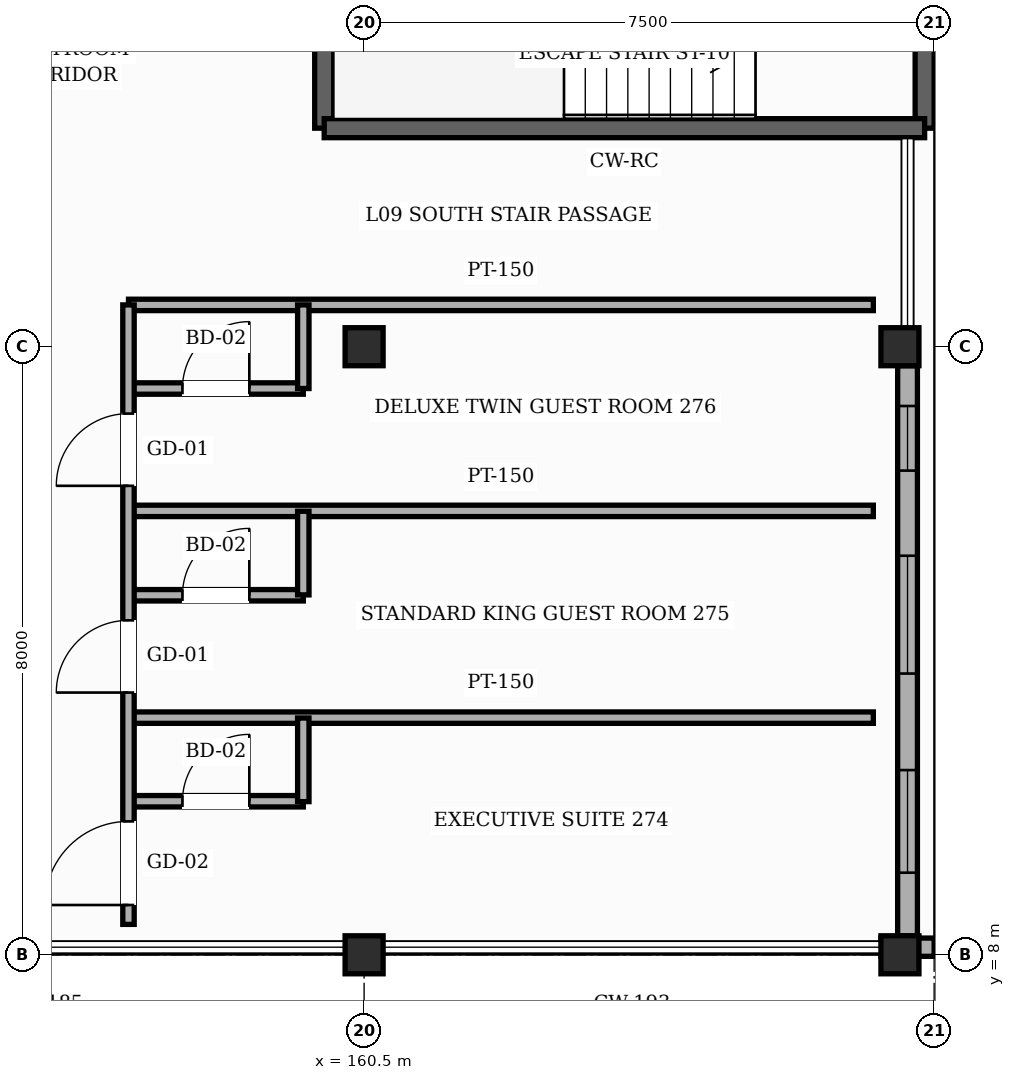
"""IFC4 building model, lengths in metres.
Left out: names, types, materials, properties, quantities, classifications, styles, units other than length and angle.
Written with IfcOpenShell. Run it as: python <this file> out.ifc"""

import sys

from ifc_helpers import new_model, si_unit, direction, frame, frame_2d, origin, origin_2d, place, context, subcontext, project, spatial, rectangle, hollow_rectangle, extrude, element, fill, save


model = new_model("IFC4")
c1 = context("Model", 3, precision=1e-05, world=origin(), true_north=direction((0.0, 1.0)))
c2 = subcontext(c1, "Body", "Model", "MODEL_VIEW")
j1 = project(units=[si_unit("LENGTHUNIT", "METRE"), si_unit("PLANEANGLEUNIT", "RADIAN")], contexts=[c1])
p1 = place(None, origin())
s1 = spatial("IfcSite", under=j1, at=p1, CompositionType="ELEMENT")
p2 = place(p1, origin())
s2 = spatial("IfcBuilding", under=s1, at=p2, CompositionType="ELEMENT")
p3 = place(p2, frame((0.0, 0.0, 39.0)))
s3 = spatial("IfcBuildingStorey", under=s2, at=p3, CompositionType="ELEMENT", Elevation=39.0)
p4 = place(p3, frame((160.5, 8.0, 0.0), z_axis=(0.0, 0.0, 1.0), x_axis=(1.0, 0.0, 0.0)))
e1 = element("IfcColumn", 1, at=p4, inside=s3, PredefinedType="COLUMN", context=c2, shape_type="SweptSolid", body=[
    extrude(hollow_rectangle(XDim=0.5, YDim=0.5, WallThickness=0.022, InnerFilletRadius=0.022, OuterFilletRadius=0.044, at=origin_2d()), origin(), (0.0, 0.0, 1.0), 3.38),
])
p5 = place(p3, frame((160.5, 16.0, 0.0), z_axis=(0.0, 0.0, 1.0), x_axis=(1.0, 0.0, 0.0)))
e2 = element("IfcColumn", 2, at=p5, inside=s3, PredefinedType="COLUMN", context=c2, shape_type="SweptSolid", body=[
    extrude(hollow_rectangle(XDim=0.5, YDim=0.5, WallThickness=0.022, InnerFilletRadius=0.022, OuterFilletRadius=0.044, at=origin_2d()), origin(), (0.0, 0.0, 1.0), 3.6),
])
p6 = place(p3, frame((167.55, 8.0, 0.0), z_axis=(0.0, 0.0, 1.0), x_axis=(1.0, 0.0, 0.0)))
e3 = element("IfcColumn", 3, at=p6, inside=s3, PredefinedType="COLUMN", context=c2, shape_type="SweptSolid", body=[
    extrude(hollow_rectangle(XDim=0.5, YDim=0.5, WallThickness=0.022, InnerFilletRadius=0.022, OuterFilletRadius=0.044, at=origin_2d()), origin(), (0.0, 0.0, 1.0), 3.38),
])
p7 = place(p3, frame((167.55, 16.0, 0.0), z_axis=(0.0, 0.0, 1.0), x_axis=(1.0, 0.0, 0.0)))
e4 = element("IfcColumn", 4, at=p7, inside=s3, PredefinedType="COLUMN", context=c2, shape_type="SweptSolid", body=[
    extrude(hollow_rectangle(XDim=0.5, YDim=0.5, WallThickness=0.022, InnerFilletRadius=0.022, OuterFilletRadius=0.044, at=origin_2d()), origin(), (0.0, 0.0, 1.0), 3.6),
])
p8 = place(p3, frame((167.65, 15.75, 0.0), z_axis=(0.0, 0.0, 1.0), x_axis=(0.0, -1.0, 0.0)))
e5 = element("IfcWall", 5, at=p8, inside=s3, PredefinedType="SOLIDWALL", context=c2, shape_type="SweptSolid", body=[
    extrude(rectangle(XDim=7.5, YDim=0.26, at=frame_2d((3.75, 0.0))), origin(), (0.0, 0.0, 1.0), 2.755),
])
p9 = place(p8, frame((5.32, 0.0, 0.85)))
e6 = element("IfcOpeningElement", 6, at=p9, cuts=e5, PredefinedType="OPENING", context=c2, shape_type="SweptSolid", body=[
    extrude(rectangle(XDim=1.35, YDim=1.35, at=frame_2d((0.675, 0.675))), frame((0.0, 0.14, 0.0), z_axis=(0.0, -1.0, 0.0), x_axis=(1.0, 0.0, 0.0)), (0.0, 0.0, 1.0), 0.28),
])
p10 = place(p8, frame((2.5, 0.0, 0.85)))
e7 = element("IfcOpeningElement", 7, at=p10, cuts=e5, PredefinedType="OPENING", context=c2, shape_type="SweptSolid", body=[
    extrude(rectangle(XDim=1.55, YDim=1.35, at=frame_2d((0.775, 0.675))), frame((0.0, 0.14, 0.0), z_axis=(0.0, -1.0, 0.0), x_axis=(1.0, 0.0, 0.0)), (0.0, 0.0, 1.0), 0.28),
])
p11 = place(p8, frame((0.53, 0.0, 0.85)))
e8 = element("IfcOpeningElement", 8, at=p11, cuts=e5, PredefinedType="OPENING", context=c2, shape_type="SweptSolid", body=[
    extrude(rectangle(XDim=0.85, YDim=1.35, at=frame_2d((0.425, 0.675))), frame((0.0, 0.14, 0.0), z_axis=(0.0, -1.0, 0.0), x_axis=(1.0, 0.0, 0.0)), (0.0, 0.0, 1.0), 0.28),
])
p12 = place(p3, frame((168.0, 8.1, 0.0), z_axis=(0.0, 0.0, 1.0), x_axis=(-1.0, 0.0, 0.0)))
e9 = element("IfcWall", 9, at=p12, inside=s3, PredefinedType="SOLIDWALL", context=c2, shape_type="SweptSolid", body=[
    extrude(rectangle(XDim=0.7, YDim=0.24, at=frame_2d((0.35, 0.0))), origin(), (0.0, 0.0, 1.0), 3.365),
])
for number, where, z_axis, x_axis in (
    (10, (167.875, 22.225, 0.0), (0.0, 0.0, 1.0), (0.0, -1.0, 0.0)),
    (11, (159.975, 18.875, 0.0), (0.0, 0.0, 1.0), (0.0, 1.0, 0.0)),
):
    element("IfcWall", number, at=place(p3, frame(where, z_axis=z_axis, x_axis=x_axis)), inside=s3, PredefinedType="SHEAR", context=c2, shape_type="SweptSolid", body=[
        extrude(rectangle(XDim=3.35, YDim=0.25, at=frame_2d((1.675, 0.0))), origin(), (0.0, 0.0, 1.0), 3.38),
    ])
p13 = place(p3, frame((167.875, 18.875, 0.0), z_axis=(0.0, 0.0, 1.0), x_axis=(-1.0, 0.0, 0.0)))
e12 = element("IfcWall", 12, at=p13, inside=s3, PredefinedType="SHEAR", context=c2, shape_type="SweptSolid", body=[
    extrude(rectangle(XDim=7.9, YDim=0.25, at=frame_2d((3.95, 0.0))), origin(), (0.0, 0.0, 1.0), 3.38),
])
p14 = place(p3, frame((157.4, 10.02, 0.0), z_axis=(0.0, 0.0, 1.0), x_axis=(1.0, 0.0, 0.0)))
e13 = element("IfcWall", 13, at=p14, inside=s3, PredefinedType="PARTITIONING", context=c2, shape_type="SweptSolid", body=[
    extrude(rectangle(XDim=2.3, YDim=0.15, at=frame_2d((1.15, 0.0))), origin(), (0.0, 0.0, 1.0), 3.365),
])
p15 = place(p14, frame((0.71, 0.0, 0.0)))
e14 = element("IfcOpeningElement", 14, at=p15, cuts=e13, PredefinedType="OPENING", context=c2, shape_type="SweptSolid", body=[
    extrude(rectangle(XDim=0.88, YDim=2.12, at=frame_2d((0.44, 1.06))), frame((0.0, 0.085, 0.0), z_axis=(0.0, -1.0, 0.0), x_axis=(1.0, 0.0, 0.0)), (0.0, 0.0, 1.0), 0.17),
])
p16 = place(p3, frame((157.4, 11.12, 0.0), z_axis=(0.0, 0.0, 1.0), x_axis=(1.0, 0.0, 0.0)))
e15 = element("IfcWall", 15, at=p16, inside=s3, PredefinedType="PARTITIONING", context=c2, shape_type="SweptSolid", body=[
    extrude(rectangle(XDim=9.8, YDim=0.15, at=frame_2d((4.9, 0.0))), origin(), (0.0, 0.0, 1.0), 3.365),
])
p17 = place(p3, frame((157.4, 12.73, 0.0), z_axis=(0.0, 0.0, 1.0), x_axis=(1.0, 0.0, 0.0)))
e16 = element("IfcWall", 16, at=p17, inside=s3, PredefinedType="PARTITIONING", context=c2, shape_type="SweptSolid", body=[
    extrude(rectangle(XDim=2.3, YDim=0.15, at=frame_2d((1.15, 0.0))), origin(), (0.0, 0.0, 1.0), 3.365),
])
p18 = place(p17, frame((0.71, 0.0, 0.0)))
e17 = element("IfcOpeningElement", 17, at=p18, cuts=e16, PredefinedType="OPENING", context=c2, shape_type="SweptSolid", body=[
    extrude(rectangle(XDim=0.88, YDim=2.12, at=frame_2d((0.44, 1.06))), frame((0.0, 0.085, 0.0), z_axis=(0.0, -1.0, 0.0), x_axis=(1.0, 0.0, 0.0)), (0.0, 0.0, 1.0), 0.17),
])
p19 = place(p3, frame((157.4, 13.84, 0.0), z_axis=(0.0, 0.0, 1.0), x_axis=(1.0, 0.0, 0.0)))
e18 = element("IfcWall", 18, at=p19, inside=s3, PredefinedType="PARTITIONING", context=c2, shape_type="SweptSolid", body=[
    extrude(rectangle(XDim=9.8, YDim=0.15, at=frame_2d((4.9, 0.0))), origin(), (0.0, 0.0, 1.0), 3.365),
])
p20 = place(p3, frame((157.4, 15.45, 0.0), z_axis=(0.0, 0.0, 1.0), x_axis=(1.0, 0.0, 0.0)))
e19 = element("IfcWall", 19, at=p20, inside=s3, PredefinedType="PARTITIONING", context=c2, shape_type="SweptSolid", body=[
    extrude(rectangle(XDim=2.3, YDim=0.15, at=frame_2d((1.15, 0.0))), origin(), (0.0, 0.0, 1.0), 3.365),
])
p21 = place(p20, frame((0.71, 0.0, 0.0)))
e20 = element("IfcOpeningElement", 20, at=p21, cuts=e19, PredefinedType="OPENING", context=c2, shape_type="SweptSolid", body=[
    extrude(rectangle(XDim=0.88, YDim=2.12, at=frame_2d((0.44, 1.06))), frame((0.0, 0.085, 0.0), z_axis=(0.0, -1.0, 0.0), x_axis=(1.0, 0.0, 0.0)), (0.0, 0.0, 1.0), 0.17),
])
p22 = place(p3, frame((157.4, 16.55, 0.0), z_axis=(0.0, 0.0, 1.0), x_axis=(1.0, 0.0, 0.0)))
e21 = element("IfcWall", 21, at=p22, inside=s3, PredefinedType="PARTITIONING", context=c2, shape_type="SweptSolid", body=[
    extrude(rectangle(XDim=9.8, YDim=0.15, at=frame_2d((4.9, 0.0))), origin(), (0.0, 0.0, 1.0), 3.365),
])
p23 = place(p3, frame((157.4, 8.4, 0.0), z_axis=(0.0, 0.0, 1.0), x_axis=(0.0, 1.0, 0.0)))
e22 = element("IfcWall", 22, at=p23, inside=s3, PredefinedType="PARTITIONING", context=c2, shape_type="SweptSolid", body=[
    extrude(rectangle(XDim=8.15, YDim=0.15, at=frame_2d((4.075, 0.0))), origin(), (0.0, 0.0, 1.0), 3.365),
])
p24 = place(p23, frame((0.255, 0.0, 0.0)))
e23 = element("IfcOpeningElement", 23, at=p24, cuts=e22, PredefinedType="OPENING", context=c2, shape_type="SweptSolid", body=[
    extrude(rectangle(XDim=1.1, YDim=2.2, at=frame_2d((0.55, 1.1))), frame((0.0, 0.085, 0.0), z_axis=(0.0, -1.0, 0.0), x_axis=(1.0, 0.0, 0.0)), (0.0, 0.0, 1.0), 0.17),
])
p25 = place(p23, frame((3.05, 0.0, 0.0)))
e24 = element("IfcOpeningElement", 24, at=p25, cuts=e22, PredefinedType="OPENING", context=c2, shape_type="SweptSolid", body=[
    extrude(rectangle(XDim=0.95, YDim=2.15, at=frame_2d((0.475, 1.075))), frame((0.0, 0.085, 0.0), z_axis=(0.0, -1.0, 0.0), x_axis=(1.0, 0.0, 0.0)), (0.0, 0.0, 1.0), 0.17),
])
p26 = place(p23, frame((5.77, 0.0, 0.0)))
e25 = element("IfcOpeningElement", 25, at=p26, cuts=e22, PredefinedType="OPENING", context=c2, shape_type="SweptSolid", body=[
    extrude(rectangle(XDim=0.95, YDim=2.15, at=frame_2d((0.475, 1.075))), frame((0.0, 0.085, 0.0), z_axis=(0.0, -1.0, 0.0), x_axis=(1.0, 0.0, 0.0)), (0.0, 0.0, 1.0), 0.17),
])
p27 = place(p3, frame((159.7, 10.015, 0.0), z_axis=(0.0, 0.0, 1.0), x_axis=(0.0, 1.0, 0.0)))
e26 = element("IfcWall", 26, at=p27, inside=s3, PredefinedType="PARTITIONING", context=c2, shape_type="SweptSolid", body=[
    extrude(rectangle(XDim=1.1, YDim=0.15, at=frame_2d((0.55, 0.0))), origin(), (0.0, 0.0, 1.0), 3.365),
])
p28 = place(p3, frame((159.7, 12.735, 0.0), z_axis=(0.0, 0.0, 1.0), x_axis=(0.0, 1.0, 0.0)))
e27 = element("IfcWall", 27, at=p28, inside=s3, PredefinedType="PARTITIONING", context=c2, shape_type="SweptSolid", body=[
    extrude(rectangle(XDim=1.1, YDim=0.15, at=frame_2d((0.55, 0.0))), origin(), (0.0, 0.0, 1.0), 3.365),
])
p29 = place(p3, frame((159.7, 15.45, 0.0), z_axis=(0.0, 0.0, 1.0), x_axis=(0.0, 1.0, 0.0)))
e28 = element("IfcWall", 28, at=p29, inside=s3, PredefinedType="PARTITIONING", context=c2, shape_type="SweptSolid", body=[
    extrude(rectangle(XDim=1.1, YDim=0.15, at=frame_2d((0.55, 0.0))), origin(), (0.0, 0.0, 1.0), 3.365),
])
p30 = place(p9, origin())
e29 = element("IfcWindow", 29, at=p30, inside=s3, PartitioningType="SINGLE_PANEL", PredefinedType="WINDOW", context=c2, shape_type="SweptSolid", body=[
    extrude(rectangle(XDim=1.35, YDim=1.35, at=frame_2d((0.675, 0.675))), frame((0.0, 0.03, 0.0), z_axis=(0.0, -1.0, 0.0), x_axis=(1.0, 0.0, 0.0)), (0.0, 0.0, 1.0), 0.06),
])
fill(e6, e29)
p31 = place(p10, origin())
e30 = element("IfcWindow", 30, at=p31, inside=s3, PartitioningType="SINGLE_PANEL", PredefinedType="WINDOW", context=c2, shape_type="SweptSolid", body=[
    extrude(rectangle(XDim=1.55, YDim=1.35, at=frame_2d((0.775, 0.675))), frame((0.0, 0.03, 0.0), z_axis=(0.0, -1.0, 0.0), x_axis=(1.0, 0.0, 0.0)), (0.0, 0.0, 1.0), 0.06),
])
fill(e7, e30)
p32 = place(p11, origin())
e31 = element("IfcWindow", 31, at=p32, inside=s3, PartitioningType="SINGLE_PANEL", PredefinedType="WINDOW", context=c2, shape_type="SweptSolid", body=[
    extrude(rectangle(XDim=0.85, YDim=1.35, at=frame_2d((0.425, 0.675))), frame((0.0, 0.03, 0.0), z_axis=(0.0, -1.0, 0.0), x_axis=(1.0, 0.0, 0.0)), (0.0, 0.0, 1.0), 0.06),
])
fill(e8, e31)
p33 = place(p24, origin())
e32 = element("IfcDoor", 32, at=p33, inside=s3, OperationType="SINGLE_SWING_LEFT", PredefinedType="DOOR", context=c2, shape_type="SweptSolid", body=[
    extrude(rectangle(XDim=1.1, YDim=2.2, at=frame_2d((0.55, 1.1))), frame((0.0, 0.025, 0.0), z_axis=(0.0, -1.0, 0.0), x_axis=(1.0, 0.0, 0.0)), (0.0, 0.0, 1.0), 0.05),
])
fill(e23, e32)
p34 = place(p15, origin())
e33 = element("IfcDoor", 33, at=p34, inside=s3, OperationType="SINGLE_SWING_RIGHT", PredefinedType="DOOR", context=c2, shape_type="SweptSolid", body=[
    extrude(rectangle(XDim=0.88, YDim=2.12, at=frame_2d((0.44, 1.06))), frame((0.0, 0.025, 0.0), z_axis=(0.0, -1.0, 0.0), x_axis=(1.0, 0.0, 0.0)), (0.0, 0.0, 1.0), 0.05),
])
fill(e14, e33)
p35 = place(p25, origin())
e34 = element("IfcDoor", 34, at=p35, inside=s3, OperationType="SINGLE_SWING_LEFT", PredefinedType="DOOR", context=c2, shape_type="SweptSolid", body=[
    extrude(rectangle(XDim=0.95, YDim=2.15, at=frame_2d((0.475, 1.075))), frame((0.0, 0.025, 0.0), z_axis=(0.0, -1.0, 0.0), x_axis=(1.0, 0.0, 0.0)), (0.0, 0.0, 1.0), 0.05),
])
fill(e24, e34)
p36 = place(p18, origin())
e35 = element("IfcDoor", 35, at=p36, inside=s3, OperationType="SINGLE_SWING_RIGHT", PredefinedType="DOOR", context=c2, shape_type="SweptSolid", body=[
    extrude(rectangle(XDim=0.88, YDim=2.12, at=frame_2d((0.44, 1.06))), frame((0.0, 0.025, 0.0), z_axis=(0.0, -1.0, 0.0), x_axis=(1.0, 0.0, 0.0)), (0.0, 0.0, 1.0), 0.05),
])
fill(e17, e35)
p37 = place(p26, origin())
e36 = element("IfcDoor", 36, at=p37, inside=s3, OperationType="SINGLE_SWING_LEFT", PredefinedType="DOOR", context=c2, shape_type="SweptSolid", body=[
    extrude(rectangle(XDim=0.95, YDim=2.15, at=frame_2d((0.475, 1.075))), frame((0.0, 0.025, 0.0), z_axis=(0.0, -1.0, 0.0), x_axis=(1.0, 0.0, 0.0)), (0.0, 0.0, 1.0), 0.05),
])
fill(e25, e36)
p38 = place(p21, origin())
e37 = element("IfcDoor", 37, at=p38, inside=s3, OperationType="SINGLE_SWING_RIGHT", PredefinedType="DOOR", context=c2, shape_type="SweptSolid", body=[
    extrude(rectangle(XDim=0.88, YDim=2.12, at=frame_2d((0.44, 1.06))), frame((0.0, 0.025, 0.0), z_axis=(0.0, -1.0, 0.0), x_axis=(1.0, 0.0, 0.0)), (0.0, 0.0, 1.0), 0.05),
])
fill(e20, e37)
save(model, sys.argv[1])
